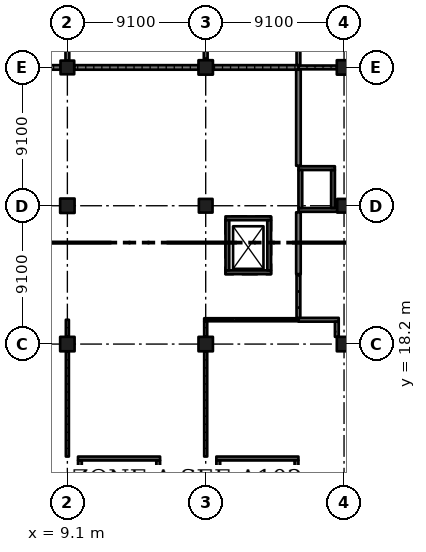
"""IFC4 building model, lengths in metres.
Left out: names, types, materials, properties, quantities, classifications, styles, units other than length and angle.
Written with IfcOpenShell. Run it as: python <this file> out.ifc"""

import sys

from ifc_helpers import new_model, si_unit, direction, frame, frame_2d, origin, origin_2d, place, context, subcontext, project, spatial, rectangle, extrude, element, fill, save


model = new_model("IFC4")
c1 = context("Model", 3, precision=1e-05, world=origin(), true_north=direction((0.0, 1.0)))
c2 = subcontext(c1, "Body", "Model", "MODEL_VIEW")
j1 = project(units=[si_unit("LENGTHUNIT", "METRE"), si_unit("PLANEANGLEUNIT", "RADIAN")], contexts=[c1])
p1 = place(None, origin())
s1 = spatial("IfcSite", under=j1, at=p1, CompositionType="ELEMENT")
p2 = place(p1, origin())
s2 = spatial("IfcBuilding", under=s1, at=p2, CompositionType="ELEMENT")
p3 = place(p2, origin())
s3 = spatial("IfcBuildingStorey", under=s2, at=p3, CompositionType="ELEMENT", Elevation=0.0)
for number, where, z_axis, x_axis in (
    (1, (9.1, 18.2, -0.4), (0.0, 0.0, 1.0), (1.0, 0.0, 0.0)),
    (2, (9.1, 27.3, -0.4), (0.0, 0.0, 1.0), (1.0, 0.0, 0.0)),
):
    element("IfcColumn", number, at=place(p3, frame(where, z_axis=z_axis, x_axis=x_axis)), inside=s3, PredefinedType="COLUMN", context=c2, shape_type="SweptSolid", body=[
        extrude(rectangle(XDim=0.95, YDim=0.95, at=origin_2d()), origin(), (0.0, 0.0, 1.0), 6.77),
    ])
p4 = place(p3, frame((9.1, 36.4, -0.4), z_axis=(0.0, 0.0, 1.0), x_axis=(1.0, 0.0, 0.0)))
e3 = element("IfcColumn", 3, at=p4, inside=s3, PredefinedType="COLUMN", context=c2, shape_type="SweptSolid", body=[
    extrude(rectangle(XDim=0.9, YDim=0.9, at=origin_2d()), origin(), (0.0, 0.0, 1.0), 6.77),
])
p5 = place(p3, frame((18.2, 18.2, -0.4), z_axis=(0.0, 0.0, 1.0), x_axis=(1.0, 0.0, 0.0)))
e4 = element("IfcColumn", 4, at=p5, inside=s3, PredefinedType="COLUMN", context=c2, shape_type="SweptSolid", body=[
    extrude(rectangle(XDim=0.95, YDim=0.95, at=origin_2d()), origin(), (0.0, 0.0, 1.0), 6.77),
])
p6 = place(p3, frame((18.2, 27.3, -0.4), z_axis=(0.0, 0.0, 1.0), x_axis=(1.0, 0.0, 0.0)))
e5 = element("IfcColumn", 5, at=p6, inside=s3, PredefinedType="COLUMN", context=c2, shape_type="SweptSolid", body=[
    extrude(rectangle(XDim=0.9, YDim=0.9, at=origin_2d()), origin(), (0.0, 0.0, 1.0), 6.77),
])
for number, where, z_axis, x_axis in (
    (6, (18.2, 36.4, -0.4), (0.0, 0.0, 1.0), (1.0, 0.0, 0.0)),
    (7, (27.3, 18.2, -0.4), (0.0, 0.0, 1.0), (1.0, 0.0, 0.0)),
):
    element("IfcColumn", number, at=place(p3, frame(where, z_axis=z_axis, x_axis=x_axis)), inside=s3, PredefinedType="COLUMN", context=c2, shape_type="SweptSolid", body=[
        extrude(rectangle(XDim=0.95, YDim=0.95, at=origin_2d()), origin(), (0.0, 0.0, 1.0), 6.77),
    ])
p7 = place(p3, frame((27.3, 27.3, -0.4), z_axis=(0.0, 0.0, 1.0), x_axis=(1.0, 0.0, 0.0)))
e8 = element("IfcColumn", 8, at=p7, inside=s3, PredefinedType="COLUMN", context=c2, shape_type="SweptSolid", body=[
    extrude(rectangle(XDim=0.9, YDim=0.9, at=origin_2d()), origin(), (0.0, 0.0, 1.0), 6.77),
])
p8 = place(p3, frame((27.3, 36.4, -0.4), z_axis=(0.0, 0.0, 1.0), x_axis=(1.0, 0.0, 0.0)))
e9 = element("IfcColumn", 9, at=p8, inside=s3, PredefinedType="COLUMN", context=c2, shape_type="SweptSolid", body=[
    extrude(rectangle(XDim=0.95, YDim=0.95, at=origin_2d()), origin(), (0.0, 0.0, 1.0), 6.77),
])
p9 = place(p3, frame((26.85, 27.025, -0.4), z_axis=(0.0, 0.0, 1.0), x_axis=(-1.0, 0.0, 0.0)))
e10 = element("IfcWall", 10, at=p9, inside=s3, PredefinedType="SHEAR", context=c2, shape_type="SweptSolid", body=[
    extrude(rectangle(XDim=2.55, YDim=0.25, at=frame_2d((1.275, 0.0))), origin(), (0.0, 0.0, 1.0), 6.77),
])
p10 = place(p3, frame((26.7, 29.775, -0.4), z_axis=(0.0, 0.0, 1.0), x_axis=(-1.0, 0.0, 0.0)))
e11 = element("IfcWall", 11, at=p10, inside=s3, PredefinedType="SHEAR", context=c2, shape_type="SweptSolid", body=[
    extrude(rectangle(XDim=2.4, YDim=0.25, at=frame_2d((1.2, 0.0))), origin(), (0.0, 0.0, 1.0), 6.77),
])
p11 = place(p3, frame((24.425, 29.65, -0.4), z_axis=(0.0, 0.0, 1.0), x_axis=(0.0, -1.0, 0.0)))
e12 = element("IfcWall", 12, at=p11, inside=s3, PredefinedType="SHEAR", context=c2, shape_type="SweptSolid", body=[
    extrude(rectangle(XDim=2.5, YDim=0.25, at=frame_2d((1.25, 0.0))), origin(), (0.0, 0.0, 1.0), 6.77),
])
p12 = place(p11, frame((0.9, 0.0, 0.4)))
e13 = element("IfcOpeningElement", 13, at=p12, cuts=e12, PredefinedType="OPENING", context=c2, shape_type="SweptSolid", body=[
    extrude(rectangle(XDim=0.7, YDim=2.1, at=frame_2d((0.35, 1.05))), frame((0.0, 0.135, 0.0), z_axis=(0.0, -1.0, 0.0), x_axis=(1.0, 0.0, 0.0)), (0.0, 0.0, 1.0), 0.27),
])
p13 = place(p3, frame((26.575, 29.65, -0.4), z_axis=(0.0, 0.0, 1.0), x_axis=(0.0, -1.0, 0.0)))
e14 = element("IfcWall", 14, at=p13, inside=s3, PredefinedType="SHEAR", context=c2, shape_type="SweptSolid", body=[
    extrude(rectangle(XDim=2.5, YDim=0.25, at=frame_2d((1.25, 0.0))), origin(), (0.0, 0.0, 1.0), 6.77),
])
p14 = place(p3, frame((22.5, 22.925, -1.4), z_axis=(0.0, 0.0, 1.0), x_axis=(-1.0, 0.0, 0.0)))
e15 = element("IfcWall", 15, at=p14, inside=s3, PredefinedType="SHEAR", context=c2, shape_type="SweptSolid", body=[
    extrude(rectangle(XDim=3.0, YDim=0.25, at=frame_2d((1.5, 0.0))), origin(), (0.0, 0.0, 1.0), 7.77),
])
p15 = place(p14, frame((0.95, 0.0, 1.4)))
e16 = element("IfcOpeningElement", 16, at=p15, cuts=e15, PredefinedType="OPENING", context=c2, shape_type="SweptSolid", body=[
    extrude(rectangle(XDim=1.1, YDim=2.1, at=frame_2d((0.55, 1.05))), frame((0.0, 0.135, 0.0), z_axis=(0.0, -1.0, 0.0), x_axis=(1.0, 0.0, 0.0)), (0.0, 0.0, 1.0), 0.27),
])
p16 = place(p3, frame((22.5, 26.475, -1.4), z_axis=(0.0, 0.0, 1.0), x_axis=(-1.0, 0.0, 0.0)))
e17 = element("IfcWall", 17, at=p16, inside=s3, PredefinedType="SHEAR", context=c2, shape_type="SweptSolid", body=[
    extrude(rectangle(XDim=3.0, YDim=0.25, at=frame_2d((1.5, 0.0))), origin(), (0.0, 0.0, 1.0), 7.77),
])
for number, where, z_axis, x_axis in (
    (18, (19.625, 26.35, -1.4), (0.0, 0.0, 1.0), (0.0, -1.0, 0.0)),
    (19, (22.375, 26.35, -1.4), (0.0, 0.0, 1.0), (0.0, -1.0, 0.0)),
):
    element("IfcWall", number, at=place(p3, frame(where, z_axis=z_axis, x_axis=x_axis)), inside=s3, PredefinedType="SHEAR", context=c2, shape_type="SweptSolid", body=[
        extrude(rectangle(XDim=3.3, YDim=0.25, at=frame_2d((1.65, 0.0))), origin(), (0.0, 0.0, 1.0), 7.77),
    ])
p17 = place(p3, frame((15.2, 10.675, -0.4), z_axis=(0.0, 0.0, 1.0), x_axis=(-1.0, 0.0, 0.0)))
e20 = element("IfcWall", 20, at=p17, inside=s3, PredefinedType="SHEAR", context=c2, shape_type="SweptSolid", body=[
    extrude(rectangle(XDim=5.4, YDim=0.25, at=frame_2d((2.7, 0.0))), origin(), (0.0, 0.0, 1.0), 6.77),
])
p18 = place(p17, frame((1.5, 0.0, 0.4)))
e21 = element("IfcOpeningElement", 21, at=p18, cuts=e20, PredefinedType="OPENING", context=c2, shape_type="SweptSolid", body=[
    extrude(rectangle(XDim=2.4, YDim=2.1, at=frame_2d((1.2, 1.05))), frame((0.0, 0.135, 0.0), z_axis=(0.0, -1.0, 0.0), x_axis=(1.0, 0.0, 0.0)), (0.0, 0.0, 1.0), 0.27),
])
p19 = place(p3, frame((9.925, 10.55, -0.4), z_axis=(0.0, 0.0, 1.0), x_axis=(0.0, -1.0, 0.0)))
e22 = element("IfcWall", 22, at=p19, inside=s3, PredefinedType="SHEAR", context=c2, shape_type="SweptSolid", body=[
    extrude(rectangle(XDim=9.6, YDim=0.25, at=frame_2d((4.8, 0.0))), origin(), (0.0, 0.0, 1.0), 6.77),
])
p20 = place(p3, frame((15.075, 10.55, -0.4), z_axis=(0.0, 0.0, 1.0), x_axis=(0.0, -1.0, 0.0)))
e23 = element("IfcWall", 23, at=p20, inside=s3, PredefinedType="SHEAR", context=c2, shape_type="SweptSolid", body=[
    extrude(rectangle(XDim=9.6, YDim=0.25, at=frame_2d((4.8, 0.0))), origin(), (0.0, 0.0, 1.0), 6.77),
])
p21 = place(p20, frame((0.45, 0.0, 0.4)))
e24 = element("IfcOpeningElement", 24, at=p21, cuts=e23, PredefinedType="OPENING", context=c2, shape_type="SweptSolid", body=[
    extrude(rectangle(XDim=1.2, YDim=2.1, at=frame_2d((0.6, 1.05))), frame((0.0, 0.135, 0.0), z_axis=(0.0, -1.0, 0.0), x_axis=(1.0, 0.0, 0.0)), (0.0, 0.0, 1.0), 0.27),
])
p22 = place(p3, frame((24.3, 10.675, -0.4), z_axis=(0.0, 0.0, 1.0), x_axis=(-1.0, 0.0, 0.0)))
e25 = element("IfcWall", 25, at=p22, inside=s3, PredefinedType="SHEAR", context=c2, shape_type="SweptSolid", body=[
    extrude(rectangle(XDim=5.4, YDim=0.25, at=frame_2d((2.7, 0.0))), origin(), (0.0, 0.0, 1.0), 6.77),
])
p23 = place(p22, frame((1.5, 0.0, 0.4)))
e26 = element("IfcOpeningElement", 26, at=p23, cuts=e25, PredefinedType="OPENING", context=c2, shape_type="SweptSolid", body=[
    extrude(rectangle(XDim=2.4, YDim=2.1, at=frame_2d((1.2, 1.05))), frame((0.0, 0.135, 0.0), z_axis=(0.0, -1.0, 0.0), x_axis=(1.0, 0.0, 0.0)), (0.0, 0.0, 1.0), 0.27),
])
p24 = place(p3, frame((19.025, 10.55, -0.4), z_axis=(0.0, 0.0, 1.0), x_axis=(0.0, -1.0, 0.0)))
e27 = element("IfcWall", 27, at=p24, inside=s3, PredefinedType="SHEAR", context=c2, shape_type="SweptSolid", body=[
    extrude(rectangle(XDim=9.6, YDim=0.25, at=frame_2d((4.8, 0.0))), origin(), (0.0, 0.0, 1.0), 6.77),
])
p25 = place(p3, frame((24.175, 10.55, -0.4), z_axis=(0.0, 0.0, 1.0), x_axis=(0.0, -1.0, 0.0)))
e28 = element("IfcWall", 28, at=p25, inside=s3, PredefinedType="SHEAR", context=c2, shape_type="SweptSolid", body=[
    extrude(rectangle(XDim=9.6, YDim=0.25, at=frame_2d((4.8, 0.0))), origin(), (0.0, 0.0, 1.0), 6.77),
])
p26 = place(p25, frame((0.45, 0.0, 0.4)))
e29 = element("IfcOpeningElement", 29, at=p26, cuts=e28, PredefinedType="OPENING", context=c2, shape_type="SweptSolid", body=[
    extrude(rectangle(XDim=1.2, YDim=2.1, at=frame_2d((0.6, 1.05))), frame((0.0, 0.135, 0.0), z_axis=(0.0, -1.0, 0.0), x_axis=(1.0, 0.0, 0.0)), (0.0, 0.0, 1.0), 0.27),
])
p27 = place(p3, frame((0.35, 36.4, 0.0), z_axis=(0.0, 0.0, 1.0), x_axis=(1.0, 0.0, 0.0)))
e30 = element("IfcWall", 30, at=p27, inside=s3, PredefinedType="SOLIDWALL", context=c2, shape_type="SweptSolid", body=[
    extrude(rectangle(XDim=8.3, YDim=0.3, at=frame_2d((4.15, 0.0))), origin(), (0.0, 0.0, 1.0), 5.32),
])
p28 = place(p27, frame((3.65, 0.0, 0.0)))
e31 = element("IfcOpeningElement", 31, at=p28, cuts=e30, PredefinedType="OPENING", context=c2, shape_type="SweptSolid", body=[
    extrude(rectangle(XDim=1.0, YDim=2.1, at=frame_2d((0.5, 1.05))), frame((0.0, 0.16, 0.0), z_axis=(0.0, -1.0, 0.0), x_axis=(1.0, 0.0, 0.0)), (0.0, 0.0, 1.0), 0.32),
])
p29 = place(p3, frame((9.1, 17.725, 0.0), z_axis=(0.0, 0.0, 1.0), x_axis=(0.0, -1.0, 0.0)))
e32 = element("IfcWall", 32, at=p29, inside=s3, PredefinedType="PARTITIONING", context=c2, shape_type="SweptSolid", body=[
    extrude(rectangle(XDim=6.925, YDim=0.2, at=frame_2d((3.462, 0.0))), origin(), (0.0, 0.0, 1.0), 5.32),
])
p30 = place(p29, frame((0.85, 0.0, 0.0)))
e33 = element("IfcOpeningElement", 33, at=p30, cuts=e32, PredefinedType="OPENING", context=c2, shape_type="SweptSolid", body=[
    extrude(rectangle(XDim=1.8, YDim=2.4, at=frame_2d((0.9, 1.2))), frame((0.0, 0.11, 0.0), z_axis=(0.0, -1.0, 0.0), x_axis=(1.0, 0.0, 0.0)), (0.0, 0.0, 1.0), 0.22),
])
p31 = place(p29, frame((4.25, 0.0, 0.0)))
e34 = element("IfcOpeningElement", 34, at=p31, cuts=e32, PredefinedType="OPENING", context=c2, shape_type="SweptSolid", body=[
    extrude(rectangle(XDim=1.8, YDim=2.4, at=frame_2d((0.9, 1.2))), frame((0.0, 0.11, 0.0), z_axis=(0.0, -1.0, 0.0), x_axis=(1.0, 0.0, 0.0)), (0.0, 0.0, 1.0), 0.22),
])
p32 = place(p3, frame((9.1, 19.8, 0.0), z_axis=(0.0, 0.0, 1.0), x_axis=(0.0, -1.0, 0.0)))
e35 = element("IfcWall", 35, at=p32, inside=s3, PredefinedType="PARTITIONING", context=c2, shape_type="SweptSolid", body=[
    extrude(rectangle(XDim=1.125, YDim=0.2, at=frame_2d((0.562, 0.0))), origin(), (0.0, 0.0, 1.0), 5.32),
])
p33 = place(p3, frame((9.1, 40.825, 0.0), z_axis=(0.0, 0.0, 1.0), x_axis=(0.0, -1.0, 0.0)))
e36 = element("IfcWall", 36, at=p33, inside=s3, PredefinedType="SOLIDWALL", context=c2, shape_type="SweptSolid", body=[
    extrude(rectangle(XDim=3.975, YDim=0.25, at=frame_2d((1.987, 0.0))), origin(), (0.0, 0.0, 1.0), 5.32),
])
p34 = place(p3, frame((9.55, 36.4, 0.0), z_axis=(0.0, 0.0, 1.0), x_axis=(1.0, 0.0, 0.0)))
e37 = element("IfcWall", 37, at=p34, inside=s3, PredefinedType="SOLIDWALL", context=c2, shape_type="SweptSolid", body=[
    extrude(rectangle(XDim=8.175, YDim=0.3, at=frame_2d((4.087, 0.0))), origin(), (0.0, 0.0, 1.0), 5.32),
])
p35 = place(p34, frame((3.55, 0.0, 0.0)))
e38 = element("IfcOpeningElement", 38, at=p35, cuts=e37, PredefinedType="OPENING", context=c2, shape_type="SweptSolid", body=[
    extrude(rectangle(XDim=1.0, YDim=2.1, at=frame_2d((0.5, 1.05))), frame((0.0, 0.16, 0.0), z_axis=(0.0, -1.0, 0.0), x_axis=(1.0, 0.0, 0.0)), (0.0, 0.0, 1.0), 0.32),
])
p36 = place(p3, frame((18.1, 19.8, 0.0), z_axis=(0.0, 0.0, 1.0), x_axis=(1.0, 0.0, 0.0)))
e39 = element("IfcWall", 39, at=p36, inside=s3, PredefinedType="PARTITIONING", context=c2, shape_type="SweptSolid", body=[
    extrude(rectangle(XDim=6.2, YDim=0.2, at=frame_2d((3.1, 0.0))), origin(), (0.0, 0.0, 1.0), 6.02),
])
p37 = place(p36, frame((2.95, 0.0, 0.0)))
e40 = element("IfcOpeningElement", 40, at=p37, cuts=e39, PredefinedType="OPENING", context=c2, shape_type="SweptSolid", body=[
    extrude(rectangle(XDim=1.8, YDim=2.4, at=frame_2d((0.9, 1.2))), frame((0.0, 0.11, 0.0), z_axis=(0.0, -1.0, 0.0), x_axis=(1.0, 0.0, 0.0)), (0.0, 0.0, 1.0), 0.22),
])
p38 = place(p3, frame((18.2, 17.725, 0.0), z_axis=(0.0, 0.0, 1.0), x_axis=(0.0, -1.0, 0.0)))
e41 = element("IfcWall", 41, at=p38, inside=s3, PredefinedType="PARTITIONING", context=c2, shape_type="SweptSolid", body=[
    extrude(rectangle(XDim=6.925, YDim=0.2, at=frame_2d((3.462, 0.0))), origin(), (0.0, 0.0, 1.0), 5.32),
])
p39 = place(p38, frame((0.85, 0.0, 0.0)))
e42 = element("IfcOpeningElement", 42, at=p39, cuts=e41, PredefinedType="OPENING", context=c2, shape_type="SweptSolid", body=[
    extrude(rectangle(XDim=1.8, YDim=2.4, at=frame_2d((0.9, 1.2))), frame((0.0, 0.11, 0.0), z_axis=(0.0, -1.0, 0.0), x_axis=(1.0, 0.0, 0.0)), (0.0, 0.0, 1.0), 0.22),
])
p40 = place(p38, frame((4.25, 0.0, 0.0)))
e43 = element("IfcOpeningElement", 43, at=p40, cuts=e41, PredefinedType="OPENING", context=c2, shape_type="SweptSolid", body=[
    extrude(rectangle(XDim=1.8, YDim=2.4, at=frame_2d((0.9, 1.2))), frame((0.0, 0.11, 0.0), z_axis=(0.0, -1.0, 0.0), x_axis=(1.0, 0.0, 0.0)), (0.0, 0.0, 1.0), 0.22),
])
p41 = place(p3, frame((18.2, 19.7, 0.0), z_axis=(0.0, 0.0, 1.0), x_axis=(0.0, -1.0, 0.0)))
e44 = element("IfcWall", 44, at=p41, inside=s3, PredefinedType="PARTITIONING", context=c2, shape_type="SweptSolid", body=[
    extrude(rectangle(XDim=1.025, YDim=0.2, at=frame_2d((0.512, 0.0))), origin(), (0.0, 0.0, 1.0), 5.32),
])
p42 = place(p3, frame((18.2, 40.55, 0.0), z_axis=(0.0, 0.0, 1.0), x_axis=(0.0, -1.0, 0.0)))
e45 = element("IfcWall", 45, at=p42, inside=s3, PredefinedType="SOLIDWALL", context=c2, shape_type="SweptSolid", body=[
    extrude(rectangle(XDim=3.675, YDim=0.25, at=frame_2d((1.837, 0.0))), origin(), (0.0, 0.0, 1.0), 5.02),
])
p43 = place(p3, frame((18.675, 36.4, 0.0), z_axis=(0.0, 0.0, 1.0), x_axis=(1.0, 0.0, 0.0)))
e46 = element("IfcWall", 46, at=p43, inside=s3, PredefinedType="SOLIDWALL", context=c2, shape_type="SweptSolid", body=[
    extrude(rectangle(XDim=5.625, YDim=0.3, at=frame_2d((2.812, 0.0))), origin(), (0.0, 0.0, 1.0), 5.32),
])
p44 = place(p43, frame((2.35, 0.0, 0.0)))
e47 = element("IfcOpeningElement", 47, at=p44, cuts=e46, PredefinedType="OPENING", context=c2, shape_type="SweptSolid", body=[
    extrude(rectangle(XDim=1.0, YDim=2.1, at=frame_2d((0.5, 1.05))), frame((0.0, 0.16, 0.0), z_axis=(0.0, -1.0, 0.0), x_axis=(1.0, 0.0, 0.0)), (0.0, 0.0, 1.0), 0.32),
])
p45 = place(p3, frame((24.3, 19.8, 0.0), z_axis=(0.0, 0.0, 1.0), x_axis=(1.0, 0.0, 0.0)))
e48 = element("IfcWall", 48, at=p45, inside=s3, PredefinedType="SOLIDWALL", context=c2, shape_type="SweptSolid", body=[
    extrude(rectangle(XDim=2.65, YDim=0.25, at=frame_2d((1.325, 0.0))), origin(), (0.0, 0.0, 1.0), 6.02),
])
p46 = place(p3, frame((24.3, 22.8, 0.0), z_axis=(0.0, 0.0, 1.0), x_axis=(0.0, -1.0, 0.0)))
e49 = element("IfcWall", 49, at=p46, inside=s3, PredefinedType="SOLIDWALL", context=c2, shape_type="SweptSolid", body=[
    extrude(rectangle(XDim=2.875, YDim=0.25, at=frame_2d((1.438, 0.0))), origin(), (0.0, 0.0, 1.0), 6.02),
])
p47 = place(p3, frame((24.3, 26.87, 0.0), z_axis=(0.0, 0.0, 1.0), x_axis=(0.0, -1.0, 0.0)))
e50 = element("IfcWall", 50, at=p47, inside=s3, PredefinedType="SOLIDWALL", context=c2, shape_type="SweptSolid", body=[
    extrude(rectangle(XDim=4.07, YDim=0.3, at=frame_2d((2.035, 0.0))), origin(), (0.0, 0.0, 1.0), 6.02),
])
p48 = place(p3, frame((24.3, 36.25, 0.0), z_axis=(0.0, 0.0, 1.0), x_axis=(0.0, -1.0, 0.0)))
e51 = element("IfcWall", 51, at=p48, inside=s3, PredefinedType="SOLIDWALL", context=c2, shape_type="SweptSolid", body=[
    extrude(rectangle(XDim=6.32, YDim=0.3, at=frame_2d((3.16, 0.0))), origin(), (0.0, 0.0, 1.0), 6.02),
])
p49 = place(p3, frame((24.3, 36.4, 0.0), z_axis=(0.0, 0.0, 1.0), x_axis=(1.0, 0.0, 0.0)))
e52 = element("IfcWall", 52, at=p49, inside=s3, PredefinedType="SOLIDWALL", context=c2, shape_type="SweptSolid", body=[
    extrude(rectangle(XDim=2.525, YDim=0.25, at=frame_2d((1.262, 0.0))), origin(), (0.0, 0.0, 1.0), 5.32),
])
p50 = place(p3, frame((24.3, 40.55, 0.0), z_axis=(0.0, 0.0, 1.0), x_axis=(0.0, -1.0, 0.0)))
e53 = element("IfcWall", 53, at=p50, inside=s3, PredefinedType="SOLIDWALL", context=c2, shape_type="SweptSolid", body=[
    extrude(rectangle(XDim=4.0, YDim=0.25, at=frame_2d((2.0, 0.0))), origin(), (0.0, 0.0, 1.0), 6.02),
])
p51 = place(p3, frame((26.825, 19.675, 0.0), z_axis=(0.0, 0.0, 1.0), x_axis=(0.0, -1.0, 0.0)))
e54 = element("IfcWall", 54, at=p51, inside=s3, PredefinedType="SOLIDWALL", context=c2, shape_type="SweptSolid", body=[
    extrude(rectangle(XDim=1.0, YDim=0.25, at=frame_2d((0.5, 0.0))), origin(), (0.0, 0.0, 1.0), 6.02),
])
p52 = place(p44, origin())
e55 = element("IfcDoor", 55, at=p52, inside=s3, OperationType="SINGLE_SWING_LEFT", PredefinedType="DOOR", context=c2, shape_type="SweptSolid", body=[
    extrude(rectangle(XDim=1.0, YDim=2.1, at=frame_2d((0.5, 1.05))), frame((0.0, 0.025, 0.0), z_axis=(0.0, -1.0, 0.0), x_axis=(1.0, 0.0, 0.0)), (0.0, 0.0, 1.0), 0.05),
])
fill(e47, e55)
p53 = place(p35, origin())
e56 = element("IfcDoor", 56, at=p53, inside=s3, OperationType="SINGLE_SWING_RIGHT", PredefinedType="DOOR", context=c2, shape_type="SweptSolid", body=[
    extrude(rectangle(XDim=1.0, YDim=2.1, at=frame_2d((0.5, 1.05))), frame((0.0, 0.025, 0.0), z_axis=(0.0, -1.0, 0.0), x_axis=(1.0, 0.0, 0.0)), (0.0, 0.0, 1.0), 0.05),
])
fill(e38, e56)
p54 = place(p30, origin())
e57 = element("IfcDoor", 57, at=p54, inside=s3, OperationType="DOUBLE_DOOR_SINGLE_SWING", PredefinedType="DOOR", context=c2, shape_type="SweptSolid", body=[
    extrude(rectangle(XDim=1.8, YDim=2.4, at=frame_2d((0.9, 1.2))), frame((0.0, 0.025, 0.0), z_axis=(0.0, -1.0, 0.0), x_axis=(1.0, 0.0, 0.0)), (0.0, 0.0, 1.0), 0.05),
])
fill(e33, e57)
p55 = place(p31, origin())
e58 = element("IfcDoor", 58, at=p55, inside=s3, OperationType="DOUBLE_DOOR_SINGLE_SWING", PredefinedType="DOOR", context=c2, shape_type="SweptSolid", body=[
    extrude(rectangle(XDim=1.8, YDim=2.4, at=frame_2d((0.9, 1.2))), frame((0.0, 0.025, 0.0), z_axis=(0.0, -1.0, 0.0), x_axis=(1.0, 0.0, 0.0)), (0.0, 0.0, 1.0), 0.05),
])
fill(e34, e58)
p56 = place(p39, origin())
e59 = element("IfcDoor", 59, at=p56, inside=s3, OperationType="DOUBLE_DOOR_SINGLE_SWING", PredefinedType="DOOR", context=c2, shape_type="SweptSolid", body=[
    extrude(rectangle(XDim=1.8, YDim=2.4, at=frame_2d((0.9, 1.2))), frame((0.0, 0.025, 0.0), z_axis=(0.0, -1.0, 0.0), x_axis=(1.0, 0.0, 0.0)), (0.0, 0.0, 1.0), 0.05),
])
fill(e42, e59)
p57 = place(p40, origin())
e60 = element("IfcDoor", 60, at=p57, inside=s3, OperationType="DOUBLE_DOOR_SINGLE_SWING", PredefinedType="DOOR", context=c2, shape_type="SweptSolid", body=[
    extrude(rectangle(XDim=1.8, YDim=2.4, at=frame_2d((0.9, 1.2))), frame((0.0, 0.025, 0.0), z_axis=(0.0, -1.0, 0.0), x_axis=(1.0, 0.0, 0.0)), (0.0, 0.0, 1.0), 0.05),
])
fill(e43, e60)
p58 = place(p37, origin())
e61 = element("IfcDoor", 61, at=p58, inside=s3, OperationType="DOUBLE_DOOR_SINGLE_SWING", PredefinedType="DOOR", context=c2, shape_type="SweptSolid", body=[
    extrude(rectangle(XDim=1.8, YDim=2.4, at=frame_2d((0.9, 1.2))), frame((0.0, 0.025, 0.0), z_axis=(0.0, -1.0, 0.0), x_axis=(1.0, 0.0, 0.0)), (0.0, 0.0, 1.0), 0.05),
])
fill(e40, e61)
p59 = place(p12, origin())
e62 = element("IfcDoor", 62, at=p59, inside=s3, OperationType="SINGLE_SWING_LEFT", PredefinedType="DOOR", context=c2, shape_type="SweptSolid", body=[
    extrude(rectangle(XDim=0.7, YDim=2.1, at=frame_2d((0.35, 1.05))), frame((0.0, 0.025, 0.0), z_axis=(0.0, -1.0, 0.0), x_axis=(1.0, 0.0, 0.0)), (0.0, 0.0, 1.0), 0.05),
])
fill(e13, e62)
p60 = place(p18, origin())
e63 = element("IfcDoor", 63, at=p60, inside=s3, OperationType="DOUBLE_DOOR_SINGLE_SWING", PredefinedType="DOOR", context=c2, shape_type="SweptSolid", body=[
    extrude(rectangle(XDim=2.4, YDim=2.1, at=frame_2d((1.2, 1.05))), frame((0.0, 0.025, 0.0), z_axis=(0.0, -1.0, 0.0), x_axis=(1.0, 0.0, 0.0)), (0.0, 0.0, 1.0), 0.05),
])
fill(e21, e63)
p61 = place(p23, origin())
e64 = element("IfcDoor", 64, at=p61, inside=s3, OperationType="DOUBLE_DOOR_SINGLE_SWING", PredefinedType="DOOR", context=c2, shape_type="SweptSolid", body=[
    extrude(rectangle(XDim=2.4, YDim=2.1, at=frame_2d((1.2, 1.05))), frame((0.0, 0.025, 0.0), z_axis=(0.0, -1.0, 0.0), x_axis=(1.0, 0.0, 0.0)), (0.0, 0.0, 1.0), 0.05),
])
fill(e26, e64)
p62 = place(p21, origin())
e65 = element("IfcDoor", 65, at=p62, inside=s3, OperationType="SINGLE_SWING_RIGHT", PredefinedType="DOOR", context=c2, shape_type="SweptSolid", body=[
    extrude(rectangle(XDim=1.2, YDim=2.1, at=frame_2d((0.6, 1.05))), frame((0.0, 0.025, 0.0), z_axis=(0.0, -1.0, 0.0), x_axis=(1.0, 0.0, 0.0)), (0.0, 0.0, 1.0), 0.05),
])
fill(e24, e65)
p63 = place(p26, origin())
e66 = element("IfcDoor", 66, at=p63, inside=s3, OperationType="SINGLE_SWING_RIGHT", PredefinedType="DOOR", context=c2, shape_type="SweptSolid", body=[
    extrude(rectangle(XDim=1.2, YDim=2.1, at=frame_2d((0.6, 1.05))), frame((0.0, 0.025, 0.0), z_axis=(0.0, -1.0, 0.0), x_axis=(1.0, 0.0, 0.0)), (0.0, 0.0, 1.0), 0.05),
])
fill(e29, e66)
p64 = place(p15, origin())
e67 = element("IfcDoor", 67, at=p64, inside=s3, OperationType="DOUBLE_DOOR_SLIDING", PredefinedType="DOOR", context=c2, shape_type="SweptSolid", body=[
    extrude(rectangle(XDim=1.1, YDim=2.1, at=frame_2d((0.55, 1.05))), frame((0.0, 0.025, 0.0), z_axis=(0.0, -1.0, 0.0), x_axis=(1.0, 0.0, 0.0)), (0.0, 0.0, 1.0), 0.05),
])
fill(e16, e67)
save(model, sys.argv[1])
